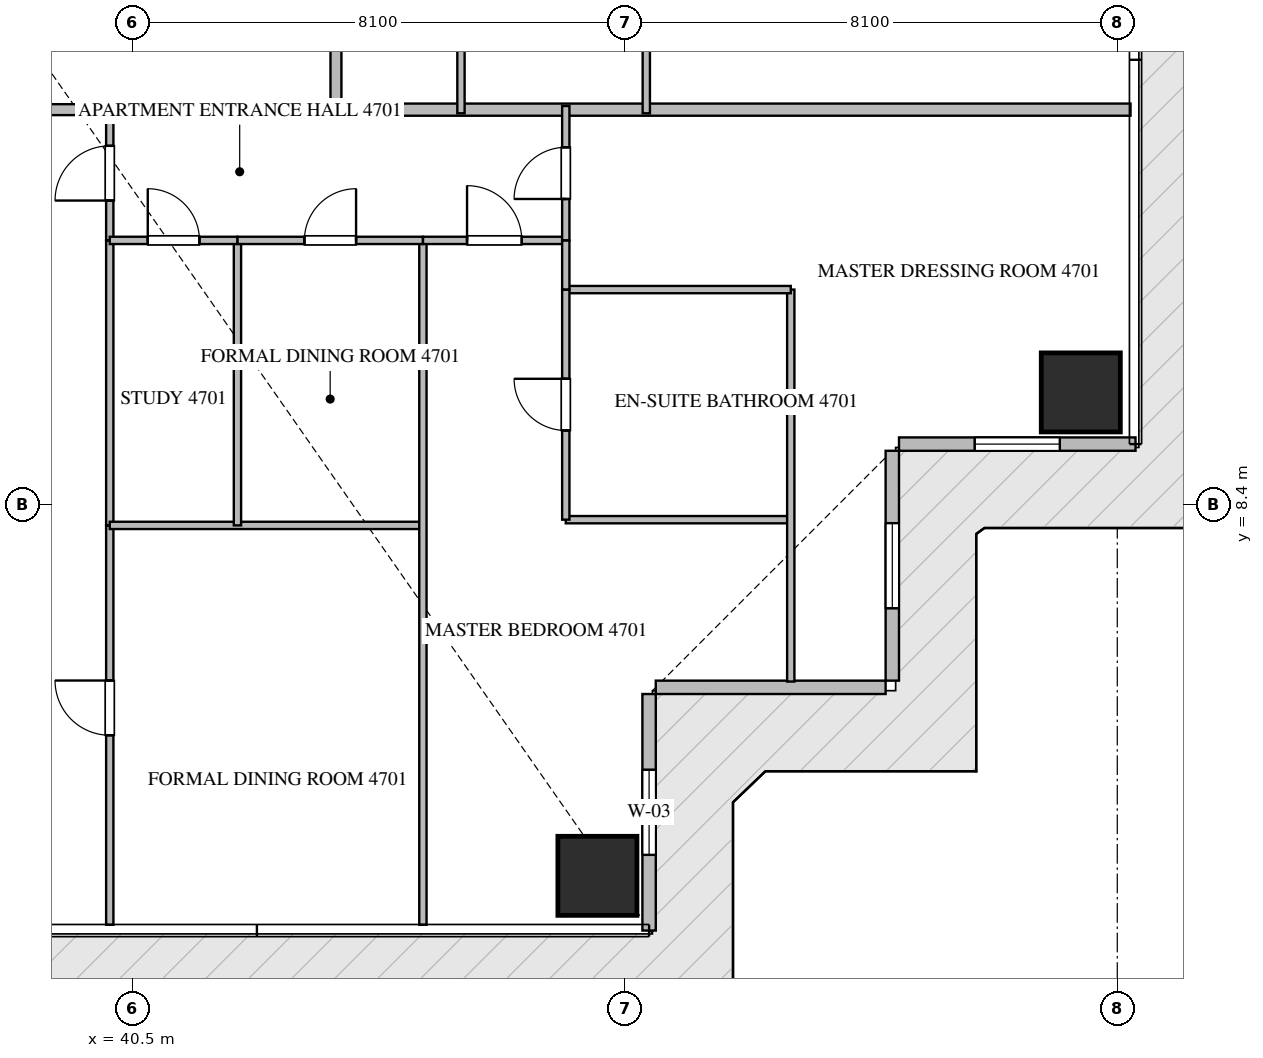
"""IFC4 building model, lengths in metres.
Left out: names, types, materials, properties, quantities, classifications, styles, units other than length and angle.
Written with IfcOpenShell. Run it as: python <this file> out.ifc"""

import sys

from ifc_helpers import new_model, si_unit, direction, frame, frame_2d, origin, origin_2d, place, context, subcontext, project, spatial, rectangle, extrude, source, transform, mapped, element, fill, save


model = new_model("IFC4")
c1 = context("Model", 3, precision=1e-05, world=origin(), true_north=direction((0.0, 1.0)))
c2 = subcontext(c1, "Body", "Model", "MODEL_VIEW")
j1 = project(units=[si_unit("LENGTHUNIT", "METRE"), si_unit("PLANEANGLEUNIT", "RADIAN")], contexts=[c1])
p1 = place(None, origin())
s1 = spatial("IfcSite", under=j1, at=p1, CompositionType="ELEMENT")
p2 = place(p1, origin())
s2 = spatial("IfcBuilding", under=s1, at=p2, CompositionType="ELEMENT")
p3 = place(p2, frame((0.0, 0.0, 187.65)))
s3 = spatial("IfcBuildingStorey", under=s2, at=p3, CompositionType="ELEMENT", Elevation=187.65)
m1 = source(origin(), c2, "Body", "SweptSolid", [
    extrude(rectangle(XDim=1.3, YDim=1.3, at=origin_2d()), origin(), (0.0, 0.0, 1.0), 3.75),
])
for number, where, z_axis, x_axis in (
    (1, (48.15, 2.3, -0.26), (0.0, 0.0, 1.0), (1.0, 0.0, 0.0)),
    (2, (56.1, 10.25, -0.26), (0.0, 0.0, 1.0), (1.0, 0.0, 0.0)),
):
    element("IfcColumn", number, at=place(p3, frame(where, z_axis=z_axis, x_axis=x_axis)), inside=s3, PredefinedType="COLUMN", context=c2, shape_type="MappedRepresentation", body=[
        mapped(m1, transform((0.0, 0.0, 0.0), scale=1.0)),
    ])
p4 = place(p3, frame((49.0, 1.4, 0.0), z_axis=(0.0, 0.0, 1.0), x_axis=(0.0, 1.0, 0.0)))
e3 = element("IfcWall", 3, at=p4, inside=s3, PredefinedType="ELEMENTEDWALL", context=c2, shape_type="SweptSolid", body=[
    extrude(rectangle(XDim=3.89, YDim=0.22, at=frame_2d((1.945, 0.0))), origin(), (0.0, 0.0, 1.0), 3.475),
])
p5 = place(p4, frame((1.245, 0.0, 0.65)))
e4 = element("IfcOpeningElement", 4, at=p5, cuts=e3, PredefinedType="OPENING", context=c2, shape_type="SweptSolid", body=[
    extrude(rectangle(XDim=1.4, YDim=2.05, at=frame_2d((0.7, 1.025))), frame((0.0, 0.12, 0.0), z_axis=(0.0, -1.0, 0.0), x_axis=(1.0, 0.0, 0.0)), (0.0, 0.0, 1.0), 0.24),
])
p6 = place(p3, frame((49.11, 5.4, 0.0), z_axis=(0.0, 0.0, 1.0), x_axis=(1.0, 0.0, 0.0)))
e5 = element("IfcWall", 5, at=p6, inside=s3, PredefinedType="ELEMENTEDWALL", context=c2, shape_type="SweptSolid", body=[
    extrude(rectangle(XDim=3.78, YDim=0.22, at=frame_2d((1.89, 0.0))), origin(), (0.0, 0.0, 1.0), 3.475),
])
p7 = place(p3, frame((53.0, 5.51, 0.0), z_axis=(0.0, 0.0, 1.0), x_axis=(0.0, 1.0, 0.0)))
e6 = element("IfcWall", 6, at=p7, inside=s3, PredefinedType="ELEMENTEDWALL", context=c2, shape_type="SweptSolid", body=[
    extrude(rectangle(XDim=3.78, YDim=0.22, at=frame_2d((1.89, 0.0))), origin(), (0.0, 0.0, 1.0), 3.475),
])
p8 = place(p7, frame((1.19, 0.0, 0.65)))
e7 = element("IfcOpeningElement", 7, at=p8, cuts=e6, PredefinedType="OPENING", context=c2, shape_type="SweptSolid", body=[
    extrude(rectangle(XDim=1.4, YDim=2.05, at=frame_2d((0.7, 1.025))), frame((0.0, 0.12, 0.0), z_axis=(0.0, -1.0, 0.0), x_axis=(1.0, 0.0, 0.0)), (0.0, 0.0, 1.0), 0.24),
])
p9 = place(p3, frame((53.11, 9.4, 0.0), z_axis=(0.0, 0.0, 1.0), x_axis=(1.0, 0.0, 0.0)))
e8 = element("IfcWall", 8, at=p9, inside=s3, PredefinedType="ELEMENTEDWALL", context=c2, shape_type="SweptSolid", body=[
    extrude(rectangle(XDim=3.89, YDim=0.22, at=frame_2d((1.945, 0.0))), origin(), (0.0, 0.0, 1.0), 3.475),
])
p10 = place(p9, frame((1.245, 0.0, 0.65)))
e9 = element("IfcOpeningElement", 9, at=p10, cuts=e8, PredefinedType="OPENING", context=c2, shape_type="SweptSolid", body=[
    extrude(rectangle(XDim=1.4, YDim=2.05, at=frame_2d((0.7, 1.025))), frame((0.0, 0.12, 0.0), z_axis=(0.0, -1.0, 0.0), x_axis=(1.0, 0.0, 0.0)), (0.0, 0.0, 1.0), 0.24),
])
p11 = place(p3, frame((43.85, 14.9, 0.0), z_axis=(0.0, 0.0, 1.0), x_axis=(1.0, 0.0, 0.0)))
e10 = element("IfcWall", 10, at=p11, inside=s3, PredefinedType="PARTITIONING", context=c2, shape_type="SweptSolid", body=[
    extrude(rectangle(XDim=13.068, YDim=0.2, at=frame_2d((6.534, 0.0))), origin(), (0.0, 0.0, 1.0), 3.49),
])
p12 = place(p3, frame((20.952, 14.9, 0.0), z_axis=(0.0, 0.0, 1.0), x_axis=(1.0, 0.0, 0.0)))
e11 = element("IfcWall", 11, at=p12, inside=s3, PredefinedType="PARTITIONING", context=c2, shape_type="SweptSolid", body=[
    extrude(rectangle(XDim=22.896, YDim=0.18, at=frame_2d((11.448, 0.0))), origin(), (0.0, 0.0, 1.0), 3.49),
])
p13 = place(p12, frame((15.809, 0.0, 0.0)))
e12 = element("IfcOpeningElement", 12, at=p13, cuts=e11, PredefinedType="OPENING", context=c2, shape_type="SweptSolid", body=[
    extrude(rectangle(XDim=1.0, YDim=2.15, at=frame_2d((0.5, 1.075))), frame((0.0, 0.1, 0.0), z_axis=(0.0, -1.0, 0.0), x_axis=(1.0, 0.0, 0.0)), (0.0, 0.0, 1.0), 0.2),
])
p14 = place(p3, frame((43.85, 14.9, 0.0), z_axis=(0.0, 0.0, 1.0), x_axis=(0.0, 1.0, 0.0)))
e13 = element("IfcWall", 13, at=p14, inside=s3, PredefinedType="PARTITIONING", context=c2, shape_type="SweptSolid", body=[
    extrude(rectangle(XDim=18.7, YDim=0.18, at=frame_2d((9.35, 0.0))), origin(), (0.0, 0.0, 1.0), 3.49),
])
p15 = place(p14, frame((6.708, 0.0, 0.0)))
e14 = element("IfcOpeningElement", 14, at=p15, cuts=e13, PredefinedType="OPENING", context=c2, shape_type="SweptSolid", body=[
    extrude(rectangle(XDim=1.0, YDim=2.15, at=frame_2d((0.5, 1.075))), frame((0.0, 0.1, 0.0), z_axis=(0.0, -1.0, 0.0), x_axis=(1.0, 0.0, 0.0)), (0.0, 0.0, 1.0), 0.2),
])
p16 = place(p14, frame((15.134, 0.0, 0.0)))
e15 = element("IfcOpeningElement", 15, at=p16, cuts=e13, PredefinedType="OPENING", context=c2, shape_type="SweptSolid", body=[
    extrude(rectangle(XDim=1.0, YDim=2.15, at=frame_2d((0.5, 1.075))), frame((0.0, 0.1, 0.0), z_axis=(0.0, -1.0, 0.0), x_axis=(1.0, 0.0, 0.0)), (0.0, 0.0, 1.0), 0.2),
])
p17 = place(p3, frame((40.13, 12.75, 0.0), z_axis=(0.0, 0.0, 1.0), x_axis=(0.0, 1.0, 0.0)))
e16 = element("IfcWall", 16, at=p17, inside=s3, PredefinedType="PARTITIONING", context=c2, shape_type="SweptSolid", body=[
    extrude(rectangle(XDim=2.21, YDim=0.12, at=frame_2d((1.105, 0.0))), origin(), (0.0, 0.0, 1.0), 3.49),
])
p18 = place(p17, frame((0.655, 0.0, 0.0)))
e17 = element("IfcOpeningElement", 17, at=p18, cuts=e16, PredefinedType="OPENING", context=c2, shape_type="SweptSolid", body=[
    extrude(rectangle(XDim=0.9, YDim=2.1, at=frame_2d((0.45, 1.05))), frame((0.0, 0.07, 0.0), z_axis=(0.0, -1.0, 0.0), x_axis=(1.0, 0.0, 0.0)), (0.0, 0.0, 1.0), 0.14),
])
p19 = place(p3, frame((40.13, 1.495, 0.0), z_axis=(0.0, 0.0, 1.0), x_axis=(0.0, 1.0, 0.0)))
e18 = element("IfcWall", 18, at=p19, inside=s3, PredefinedType="PARTITIONING", context=c2, shape_type="SweptSolid", body=[
    extrude(rectangle(XDim=6.568, YDim=0.12, at=frame_2d((3.284, 0.0))), origin(), (0.0, 0.0, 1.0), 3.49),
])
p20 = place(p19, frame((3.117, 0.0, 0.0)))
e19 = element("IfcOpeningElement", 19, at=p20, cuts=e18, PredefinedType="OPENING", context=c2, shape_type="SweptSolid", body=[
    extrude(rectangle(XDim=0.9, YDim=2.1, at=frame_2d((0.45, 1.05))), frame((0.0, 0.07, 0.0), z_axis=(0.0, -1.0, 0.0), x_axis=(1.0, 0.0, 0.0)), (0.0, 0.0, 1.0), 0.14),
])
p21 = place(p3, frame((40.13, 8.065, 0.0), z_axis=(0.0, 0.0, 1.0), x_axis=(0.0, 1.0, 0.0)))
e20 = element("IfcWall", 20, at=p21, inside=s3, PredefinedType="PARTITIONING", context=c2, shape_type="SweptSolid", body=[
    extrude(rectangle(XDim=4.683, YDim=0.12, at=frame_2d((2.342, 0.0))), origin(), (0.0, 0.0, 1.0), 3.49),
])
p22 = place(p3, frame((40.13, 8.063, 0.0), z_axis=(0.0, 0.0, 1.0), x_axis=(1.0, 0.0, 0.0)))
e21 = element("IfcWall", 21, at=p22, inside=s3, PredefinedType="PARTITIONING", context=c2, shape_type="SweptSolid", body=[
    extrude(rectangle(XDim=5.15, YDim=0.12, at=frame_2d((2.575, 0.0))), origin(), (0.0, 0.0, 1.0), 3.49),
])
p23 = place(p3, frame((45.28, 1.495, 0.0), z_axis=(0.0, 0.0, 1.0), x_axis=(0.0, 1.0, 0.0)))
e22 = element("IfcWall", 22, at=p23, inside=s3, PredefinedType="PARTITIONING", context=c2, shape_type="SweptSolid", body=[
    extrude(rectangle(XDim=11.255, YDim=0.12, at=frame_2d((5.627, 0.0))), origin(), (0.0, 0.0, 1.0), 3.49),
])
p24 = place(p3, frame((42.23, 8.063, 0.0), z_axis=(0.0, 0.0, 1.0), x_axis=(0.0, 1.0, 0.0)))
e23 = element("IfcWall", 23, at=p24, inside=s3, PredefinedType="PARTITIONING", context=c2, shape_type="SweptSolid", body=[
    extrude(rectangle(XDim=4.687, YDim=0.12, at=frame_2d((2.344, 0.0))), origin(), (0.0, 0.0, 1.0), 3.49),
])
p25 = place(p3, frame((40.13, 12.75, 0.0), z_axis=(0.0, 0.0, 1.0), x_axis=(1.0, 0.0, 0.0)))
e24 = element("IfcWall", 24, at=p25, inside=s3, PredefinedType="PARTITIONING", context=c2, shape_type="SweptSolid", body=[
    extrude(rectangle(XDim=2.1, YDim=0.12, at=frame_2d((1.05, 0.0))), origin(), (0.0, 0.0, 1.0), 3.49),
])
p26 = place(p25, frame((0.625, 0.0, 0.0)))
e25 = element("IfcOpeningElement", 25, at=p26, cuts=e24, PredefinedType="OPENING", context=c2, shape_type="SweptSolid", body=[
    extrude(rectangle(XDim=0.85, YDim=2.1, at=frame_2d((0.425, 1.05))), frame((0.0, 0.07, 0.0), z_axis=(0.0, -1.0, 0.0), x_axis=(1.0, 0.0, 0.0)), (0.0, 0.0, 1.0), 0.14),
])
p27 = place(p3, frame((42.232, 12.75, 0.0), z_axis=(0.0, 0.0, 1.0), x_axis=(1.0, 0.0, 0.0)))
e26 = element("IfcWall", 26, at=p27, inside=s3, PredefinedType="PARTITIONING", context=c2, shape_type="SweptSolid", body=[
    extrude(rectangle(XDim=3.048, YDim=0.12, at=frame_2d((1.524, 0.0))), origin(), (0.0, 0.0, 1.0), 3.49),
])
p28 = place(p27, frame((1.099, 0.0, 0.0)))
e27 = element("IfcOpeningElement", 27, at=p28, cuts=e26, PredefinedType="OPENING", context=c2, shape_type="SweptSolid", body=[
    extrude(rectangle(XDim=0.85, YDim=2.1, at=frame_2d((0.425, 1.05))), frame((0.0, 0.07, 0.0), z_axis=(0.0, -1.0, 0.0), x_axis=(1.0, 0.0, 0.0)), (0.0, 0.0, 1.0), 0.14),
])
p29 = place(p3, frame((45.282, 12.75, 0.0), z_axis=(0.0, 0.0, 1.0), x_axis=(1.0, 0.0, 0.0)))
e28 = element("IfcWall", 28, at=p29, inside=s3, PredefinedType="PARTITIONING", context=c2, shape_type="SweptSolid", body=[
    extrude(rectangle(XDim=2.348, YDim=0.12, at=frame_2d((1.174, 0.0))), origin(), (0.0, 0.0, 1.0), 3.49),
])
p30 = place(p29, frame((0.724, 0.0, 0.0)))
e29 = element("IfcOpeningElement", 29, at=p30, cuts=e28, PredefinedType="OPENING", context=c2, shape_type="SweptSolid", body=[
    extrude(rectangle(XDim=0.9, YDim=2.1, at=frame_2d((0.45, 1.05))), frame((0.0, 0.07, 0.0), z_axis=(0.0, -1.0, 0.0), x_axis=(1.0, 0.0, 0.0)), (0.0, 0.0, 1.0), 0.14),
])
p31 = place(p3, frame((47.63, 8.157, 0.0), z_axis=(0.0, 0.0, 1.0), x_axis=(1.0, 0.0, 0.0)))
e30 = element("IfcWall", 30, at=p31, inside=s3, PredefinedType="PARTITIONING", context=c2, shape_type="SweptSolid", body=[
    extrude(rectangle(XDim=3.7, YDim=0.12, at=frame_2d((1.85, 0.0))), origin(), (0.0, 0.0, 1.0), 3.49),
])
p32 = place(p3, frame((51.33, 5.495, 0.0), z_axis=(0.0, 0.0, 1.0), x_axis=(0.0, 1.0, 0.0)))
e31 = element("IfcWall", 31, at=p32, inside=s3, PredefinedType="PARTITIONING", context=c2, shape_type="SweptSolid", body=[
    extrude(rectangle(XDim=6.446, YDim=0.12, at=frame_2d((3.223, 0.0))), origin(), (0.0, 0.0, 1.0), 3.49),
])
p33 = place(p3, frame((47.63, 11.941, 0.0), z_axis=(0.0, 0.0, 1.0), x_axis=(1.0, 0.0, 0.0)))
e32 = element("IfcWall", 32, at=p33, inside=s3, PredefinedType="PARTITIONING", context=c2, shape_type="SweptSolid", body=[
    extrude(rectangle(XDim=3.7, YDim=0.12, at=frame_2d((1.85, 0.0))), origin(), (0.0, 0.0, 1.0), 3.49),
])
p34 = place(p3, frame((47.63, 8.157, 0.0), z_axis=(0.0, 0.0, 1.0), x_axis=(0.0, 1.0, 0.0)))
e33 = element("IfcWall", 33, at=p34, inside=s3, PredefinedType="PARTITIONING", context=c2, shape_type="SweptSolid", body=[
    extrude(rectangle(XDim=3.784, YDim=0.12, at=frame_2d((1.892, 0.0))), origin(), (0.0, 0.0, 1.0), 3.49),
])
p35 = place(p34, frame((1.467, 0.0, 0.0)))
e34 = element("IfcOpeningElement", 34, at=p35, cuts=e33, PredefinedType="OPENING", context=c2, shape_type="SweptSolid", body=[
    extrude(rectangle(XDim=0.85, YDim=2.1, at=frame_2d((0.425, 1.05))), frame((0.0, 0.07, 0.0), z_axis=(0.0, -1.0, 0.0), x_axis=(1.0, 0.0, 0.0)), (0.0, 0.0, 1.0), 0.14),
])
p36 = place(p3, frame((47.63, 11.943, 0.0), z_axis=(0.0, 0.0, 1.0), x_axis=(0.0, 1.0, 0.0)))
e35 = element("IfcWall", 35, at=p36, inside=s3, PredefinedType="PARTITIONING", context=c2, shape_type="SweptSolid", body=[
    extrude(rectangle(XDim=0.807, YDim=0.12, at=frame_2d((0.403, 0.0))), origin(), (0.0, 0.0, 1.0), 3.49),
])
p37 = place(p3, frame((47.63, 12.752, 0.0), z_axis=(0.0, 0.0, 1.0), x_axis=(0.0, 1.0, 0.0)))
e36 = element("IfcWall", 36, at=p37, inside=s3, PredefinedType="PARTITIONING", context=c2, shape_type="SweptSolid", body=[
    extrude(rectangle(XDim=2.208, YDim=0.12, at=frame_2d((1.104, 0.0))), origin(), (0.0, 0.0, 1.0), 3.49),
])
p38 = place(p37, frame((0.679, 0.0, 0.0)))
e37 = element("IfcOpeningElement", 37, at=p38, cuts=e36, PredefinedType="OPENING", context=c2, shape_type="SweptSolid", body=[
    extrude(rectangle(XDim=0.85, YDim=2.1, at=frame_2d((0.425, 1.05))), frame((0.0, 0.07, 0.0), z_axis=(0.0, -1.0, 0.0), x_axis=(1.0, 0.0, 0.0)), (0.0, 0.0, 1.0), 0.14),
])
for number, where, z_axis, x_axis in (
    (38, (48.954, 14.84, 0.0), (0.0, 0.0, 1.0), (0.0, 1.0, 0.0)),
    (39, (45.906, 14.84, 0.0), (0.0, 0.0, 1.0), (0.0, 1.0, 0.0)),
):
    element("IfcWall", number, at=place(p3, frame(where, z_axis=z_axis, x_axis=x_axis)), inside=s3, PredefinedType="PARTITIONING", context=c2, shape_type="SweptSolid", body=[
        extrude(rectangle(XDim=4.56, YDim=0.12, at=frame_2d((2.28, 0.0))), origin(), (0.0, 0.0, 1.0), 3.49),
    ])
m2 = source(origin(), c2, "Body", "SweptSolid", [
    extrude(rectangle(XDim=1.4, YDim=2.05, at=frame_2d((0.7, 1.025))), frame((0.0, 0.03, 0.0), z_axis=(0.0, -1.0, 0.0), x_axis=(1.0, 0.0, 0.0)), (0.0, 0.0, 1.0), 0.06),
])
p39 = place(p5, origin())
e40 = element("IfcWindow", 40, at=p39, inside=s3, PartitioningType="SINGLE_PANEL", PredefinedType="WINDOW", context=c2, shape_type="MappedRepresentation", body=[
    mapped(m2, transform((0.0, 0.0, 0.0), scale=1.0)),
])
fill(e4, e40)
p40 = place(p8, origin())
e41 = element("IfcWindow", 41, at=p40, inside=s3, PartitioningType="SINGLE_PANEL", PredefinedType="WINDOW", context=c2, shape_type="MappedRepresentation", body=[
    mapped(m2, transform((0.0, 0.0, 0.0), scale=1.0)),
])
fill(e7, e41)
p41 = place(p10, origin())
e42 = element("IfcWindow", 42, at=p41, inside=s3, PartitioningType="SINGLE_PANEL", PredefinedType="WINDOW", context=c2, shape_type="MappedRepresentation", body=[
    mapped(m2, transform((0.0, 0.0, 0.0), scale=1.0)),
])
fill(e9, e42)
m3 = source(origin(), c2, "Body", "SweptSolid", [
    extrude(rectangle(XDim=0.9, YDim=2.1, at=frame_2d((0.45, 1.05))), frame((0.0, 0.025, 0.0), z_axis=(0.0, -1.0, 0.0), x_axis=(1.0, 0.0, 0.0)), (0.0, 0.0, 1.0), 0.05),
])
p42 = place(p18, origin())
e43 = element("IfcDoor", 43, at=p42, inside=s3, OperationType="SINGLE_SWING_LEFT", PredefinedType="DOOR", context=c2, shape_type="MappedRepresentation", body=[
    mapped(m3, transform((0.0, 0.0, 0.0), scale=1.0)),
])
fill(e17, e43)
p43 = place(p20, origin())
e44 = element("IfcDoor", 44, at=p43, inside=s3, OperationType="SINGLE_SWING_RIGHT", PredefinedType="DOOR", context=c2, shape_type="MappedRepresentation", body=[
    mapped(m3, transform((0.0, 0.0, 0.0), scale=1.0)),
])
fill(e19, e44)
m4 = source(origin(), c2, "Body", "SweptSolid", [
    extrude(rectangle(XDim=0.85, YDim=2.1, at=frame_2d((0.425, 1.05))), frame((0.0, 0.025, 0.0), z_axis=(0.0, -1.0, 0.0), x_axis=(1.0, 0.0, 0.0)), (0.0, 0.0, 1.0), 0.05),
])
p44 = place(p26, origin())
e45 = element("IfcDoor", 45, at=p44, inside=s3, OperationType="SINGLE_SWING_LEFT", PredefinedType="DOOR", context=c2, shape_type="MappedRepresentation", body=[
    mapped(m4, transform((0.0, 0.0, 0.0), scale=1.0)),
])
fill(e25, e45)
p45 = place(p28, origin())
e46 = element("IfcDoor", 46, at=p45, inside=s3, OperationType="SINGLE_SWING_RIGHT", PredefinedType="DOOR", context=c2, shape_type="MappedRepresentation", body=[
    mapped(m4, transform((0.0, 0.0, 0.0), scale=1.0)),
])
fill(e27, e46)
p46 = place(p30, origin())
e47 = element("IfcDoor", 47, at=p46, inside=s3, OperationType="SINGLE_SWING_LEFT", PredefinedType="DOOR", context=c2, shape_type="MappedRepresentation", body=[
    mapped(m3, transform((0.0, 0.0, 0.0), scale=1.0)),
])
fill(e29, e47)
p47 = place(p35, origin())
e48 = element("IfcDoor", 48, at=p47, inside=s3, OperationType="SINGLE_SWING_RIGHT", PredefinedType="DOOR", context=c2, shape_type="MappedRepresentation", body=[
    mapped(m4, transform((0.0, 0.0, 0.0), scale=1.0)),
])
fill(e34, e48)
p48 = place(p38, origin())
e49 = element("IfcDoor", 49, at=p48, inside=s3, OperationType="SINGLE_SWING_LEFT", PredefinedType="DOOR", context=c2, shape_type="MappedRepresentation", body=[
    mapped(m4, transform((0.0, 0.0, 0.0), scale=1.0)),
])
fill(e37, e49)
save(model, sys.argv[1])
